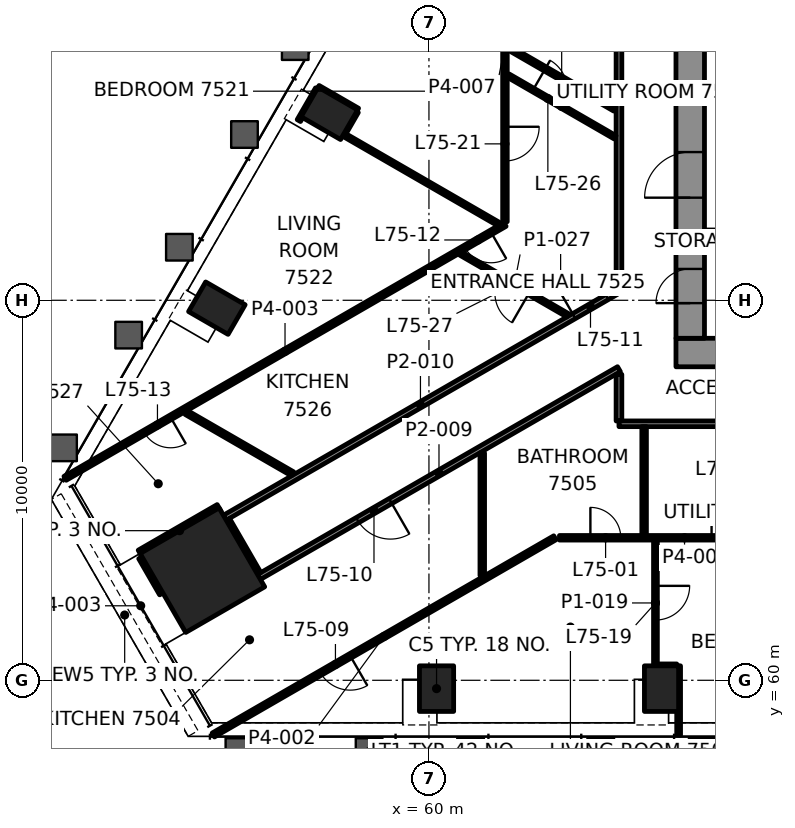
"""IFC4 building model, lengths in metres.
Left out: names, types, materials, properties, quantities, classifications, styles, units other than length and angle.
Written with IfcOpenShell. Run it as: python <this file> out.ifc"""

import sys

from ifc_helpers import new_model, si_unit, direction, frame, frame_2d, origin, origin_2d, place, context, subcontext, project, spatial, rectangle, hollow_rectangle, extrude, element, fill, save


model = new_model("IFC4")
c1 = context("Model", 3, precision=1e-05, world=origin(), true_north=direction((0.0, 1.0)))
c2 = subcontext(c1, "Body", "Model", "MODEL_VIEW")
j1 = project(units=[si_unit("LENGTHUNIT", "METRE"), si_unit("PLANEANGLEUNIT", "RADIAN")], contexts=[c1])
p1 = place(None, origin())
s1 = spatial("IfcSite", under=j1, at=p1, CompositionType="ELEMENT")
p2 = place(p1, origin())
s2 = spatial("IfcBuilding", under=s1, at=p2, CompositionType="ELEMENT")
p3 = place(p2, frame((0.0, 0.0, 309.1)))
s3 = spatial("IfcBuildingStorey", under=s2, at=p3, CompositionType="ELEMENT", Elevation=309.1)
p4 = place(p3, frame((54.039, 62.898, 0.0), z_axis=(0.0, 0.0, 1.0), x_axis=(0.5, -0.866025403784, 0.0)))
e1 = element("IfcColumn", 1, at=p4, inside=s3, PredefinedType="COLUMN", context=c2, shape_type="SweptSolid", body=[
    extrude(rectangle(XDim=2.4, YDim=2.4, at=origin_2d()), origin(), (0.0, 0.0, 1.0), 3.5),
])
for number, where, z_axis, x_axis in (
    (2, (60.2, 59.78, -0.0), (0.0, 0.0, 1.0), (1.0, 0.0, 0.0)),
    (3, (66.12, 59.78, -0.0), (0.0, 0.0, 1.0), (1.0, 0.0, 0.0)),
    (4, (57.379, 74.919, -0.0), (0.0, 0.0, 1.0), (-0.5, -0.866, 0.0)),
    (5, (54.419, 69.793, -0.0), (0.0, 0.0, 1.0), (-0.5, -0.866, 0.0)),
):
    element("IfcColumn", number, at=place(p3, frame(where, z_axis=z_axis, x_axis=x_axis)), inside=s3, PredefinedType="COLUMN", context=c2, shape_type="SweptSolid", body=[
        extrude(hollow_rectangle(XDim=0.9, YDim=1.2, WallThickness=0.06, at=origin_2d()), origin(), (0.0, 0.0, 1.0), 3.5),
    ])
p5 = place(p3, frame((66.5, 68.625, 0.0), z_axis=(0.0, 0.0, 1.0), x_axis=(1.0, 0.0, 0.0)))
e6 = element("IfcWall", 6, at=p5, inside=s3, PredefinedType="SHEAR", context=c2, shape_type="SweptSolid", body=[
    extrude(rectangle(XDim=17.0, YDim=0.75, at=frame_2d((8.5, 0.0))), origin(), (0.0, 0.0, 1.0), 3.3),
])
p6 = place(p5, frame((2.7, 0.0, 0.0)))
e7 = element("IfcOpeningElement", 7, at=p6, cuts=e6, PredefinedType="OPENING", context=c2, shape_type="SweptSolid", body=[
    extrude(rectangle(XDim=0.9, YDim=2.1, at=frame_2d((0.45, 1.05))), frame((0.0, 0.385, 0.0), z_axis=(0.0, -1.0, 0.0), x_axis=(1.0, 0.0, 0.0)), (0.0, 0.0, 1.0), 0.77),
])
p7 = place(p3, frame((66.875, 69.0, 0.0), z_axis=(0.0, 0.0, 1.0), x_axis=(0.0, 1.0, 0.0)))
e8 = element("IfcWall", 8, at=p7, inside=s3, PredefinedType="SHEAR", context=c2, shape_type="SweptSolid", body=[
    extrude(rectangle(XDim=12.0, YDim=0.75, at=frame_2d((6.0, 0.0))), origin(), (0.0, 0.0, 1.0), 3.3),
])
p8 = place(p7, frame((3.7, 0.0, 0.0)))
e9 = element("IfcOpeningElement", 9, at=p8, cuts=e8, PredefinedType="OPENING", context=c2, shape_type="SweptSolid", body=[
    extrude(rectangle(XDim=1.2, YDim=2.1, at=frame_2d((0.6, 1.05))), frame((0.0, 0.385, 0.0), z_axis=(0.0, -1.0, 0.0), x_axis=(1.0, 0.0, 0.0)), (0.0, 0.0, 1.0), 0.77),
])
p9 = place(p7, frame((0.925, 0.0, 0.0)))
e10 = element("IfcOpeningElement", 10, at=p9, cuts=e8, PredefinedType="OPENING", context=c2, shape_type="SweptSolid", body=[
    extrude(rectangle(XDim=0.9, YDim=2.1, at=frame_2d((0.45, 1.05))), frame((0.0, 0.385, 0.0), z_axis=(0.0, -1.0, 0.0), x_axis=(1.0, 0.0, 0.0)), (0.0, 0.0, 1.0), 0.77),
])
p10 = place(p3, frame((66.02, 60.38, 0.0), z_axis=(0.0, 0.0, 1.0), x_axis=(1.0, 0.0, 0.0)))
e11 = element("IfcWall", 11, at=p10, inside=s3, PredefinedType="PARTITIONING", context=c2, shape_type="SweptSolid", body=[
    extrude(rectangle(XDim=0.5, YDim=0.1, at=frame_2d((0.25, 0.0))), origin(), (0.0, 0.0, 1.0), 2.7),
])
p11 = place(p3, frame((63.434, 63.75, 0.0), z_axis=(0.0, 0.0, 1.0), x_axis=(1.0, 0.0, 0.0)))
e12 = element("IfcWall", 12, at=p11, inside=s3, PredefinedType="PARTITIONING", context=c2, shape_type="SweptSolid", body=[
    extrude(rectangle(XDim=6.582, YDim=0.12, at=frame_2d((3.291, 0.0))), origin(), (0.0, 0.0, 1.0), 2.7),
])
p12 = place(p11, frame((0.814, 0.0, 0.0)))
e13 = element("IfcOpeningElement", 13, at=p12, cuts=e12, PredefinedType="OPENING", context=c2, shape_type="SweptSolid", body=[
    extrude(rectangle(XDim=0.8, YDim=2.1, at=frame_2d((0.4, 1.05))), frame((0.0, 0.07, 0.0), z_axis=(0.0, -1.0, 0.0), x_axis=(1.0, 0.0, 0.0)), (0.0, 0.0, 1.0), 0.14),
])
p13 = place(p11, frame((4.002, 0.0, 0.0)))
e14 = element("IfcOpeningElement", 14, at=p13, cuts=e12, PredefinedType="OPENING", context=c2, shape_type="SweptSolid", body=[
    extrude(rectangle(XDim=0.9, YDim=2.1, at=frame_2d((0.45, 1.05))), frame((0.0, 0.07, 0.0), z_axis=(0.0, -1.0, 0.0), x_axis=(1.0, 0.0, 0.0)), (0.0, 0.0, 1.0), 0.14),
])
p14 = place(p3, frame((85.0, 66.75, 0.0), z_axis=(0.0, 0.0, 1.0), x_axis=(-1.0, 0.0, 0.0)))
e15 = element("IfcWall", 15, at=p14, inside=s3, PredefinedType="PARTITIONING", context=c2, shape_type="SweptSolid", body=[
    extrude(rectangle(XDim=20.0, YDim=0.15, at=frame_2d((10.0, 0.0))), origin(), (0.0, 0.0, 1.0), 2.7),
])
p15 = place(p14, frame((2.135, 0.0, 0.0)))
e16 = element("IfcOpeningElement", 16, at=p15, cuts=e15, PredefinedType="OPENING", context=c2, shape_type="SweptSolid", body=[
    extrude(rectangle(XDim=1.0, YDim=2.1, at=frame_2d((0.5, 1.05))), frame((0.0, 0.085, 0.0), z_axis=(0.0, -1.0, 0.0), x_axis=(1.0, 0.0, 0.0)), (0.0, 0.0, 1.0), 0.17),
])
p16 = place(p14, frame((9.55, 0.0, 0.0)))
e17 = element("IfcOpeningElement", 17, at=p16, cuts=e15, PredefinedType="OPENING", context=c2, shape_type="SweptSolid", body=[
    extrude(rectangle(XDim=0.9, YDim=2.1, at=frame_2d((0.45, 1.05))), frame((0.0, 0.085, 0.0), z_axis=(0.0, -1.0, 0.0), x_axis=(1.0, 0.0, 0.0)), (0.0, 0.0, 1.0), 0.17),
])
p17 = place(p3, frame((63.314, 63.75, 0.0), z_axis=(0.0, 0.0, 1.0), x_axis=(-0.866030084385, -0.499991892875, 0.0)))
e18 = element("IfcWall", 18, at=p17, inside=s3, PredefinedType="PARTITIONING", context=c2, shape_type="SweptSolid", body=[
    extrude(rectangle(XDim=10.38, YDim=0.12, at=frame_2d((5.19, 0.0))), origin(), (0.0, 0.0, 1.0), 2.7),
])
p18 = place(p17, frame((6.218, 0.0, 0.0)))
e19 = element("IfcOpeningElement", 19, at=p18, cuts=e18, PredefinedType="OPENING", context=c2, shape_type="SweptSolid", body=[
    extrude(rectangle(XDim=0.9, YDim=2.1, at=frame_2d((0.45, 1.05))), frame((0.0, 0.07, 0.0), z_axis=(0.0, -1.0, 0.0), x_axis=(1.0, 0.0, 0.0)), (0.0, 0.0, 1.0), 0.14),
])
p19 = place(p3, frame((65.0, 68.187, 0.0), z_axis=(0.0, 0.0, 1.0), x_axis=(-0.866028339337, -0.499994915439, 0.0)))
e20 = element("IfcWall", 20, at=p19, inside=s3, PredefinedType="PARTITIONING", context=c2, shape_type="SweptSolid", body=[
    extrude(rectangle(XDim=10.937, YDim=0.15, at=frame_2d((5.468, 0.0))), origin(), (0.0, 0.0, 1.0), 2.697),
])
p20 = place(p19, frame((6.943, 0.0, 0.0)))
e21 = element("IfcOpeningElement", 21, at=p20, cuts=e20, PredefinedType="OPENING", context=c2, shape_type="SweptSolid", body=[
    extrude(rectangle(XDim=1.0, YDim=2.1, at=frame_2d((0.5, 1.05))), frame((0.0, 0.085, 0.0), z_axis=(0.0, -1.0, 0.0), x_axis=(1.0, 0.0, 0.0)), (0.0, 0.0, 1.0), 0.17),
])
p21 = place(p3, frame((54.628, 64.278, 0.0), z_axis=(0.0, 0.0, 1.0), x_axis=(0.866033426221, 0.499986104476, 0.0)))
e22 = element("IfcWall", 22, at=p21, inside=s3, PredefinedType="PARTITIONING", context=c2, shape_type="SweptSolid", body=[
    extrude(rectangle(XDim=11.89, YDim=0.15, at=frame_2d((5.945, 0.0))), origin(), (0.0, 0.0, 1.0), 2.7),
])
p22 = place(p21, frame((10.612, 0.0, 0.0)))
e23 = element("IfcOpeningElement", 23, at=p22, cuts=e22, PredefinedType="OPENING", context=c2, shape_type="SweptSolid", body=[
    extrude(rectangle(XDim=1.0, YDim=2.1, at=frame_2d((0.5, 1.05))), frame((0.0, 0.085, 0.0), z_axis=(0.0, -1.0, 0.0), x_axis=(1.0, 0.0, 0.0)), (0.0, 0.0, 1.0), 0.17),
])
p23 = place(p3, frame((52.4, 63.337, 0.0), z_axis=(0.0, 0.0, 1.0), x_axis=(0.866024647952, 0.500001309137, 0.0)))
e24 = element("IfcWall", 24, at=p23, inside=s3, PredefinedType="PARTITIONING", context=c2, shape_type="SweptSolid", body=[
    extrude(rectangle(XDim=2.4, YDim=0.2, at=frame_2d((1.2, 0.0))), origin(), (0.0, 0.0, 1.0), 2.7),
])
p24 = place(p3, frame((62.0, 71.998, 0.0), z_axis=(0.0, 0.0, 1.0), x_axis=(-0.866025574339, -0.499999704591, 0.0)))
e25 = element("IfcWall", 25, at=p24, inside=s3, PredefinedType="PARTITIONING", context=c2, shape_type="SweptSolid", body=[
    extrude(rectangle(XDim=13.365, YDim=0.12, at=frame_2d((6.682, 0.0))), origin(), (0.0, 0.0, 1.0), 2.7),
])
p25 = place(p24, frame((0.421, 0.0, 0.0)))
e26 = element("IfcOpeningElement", 26, at=p25, cuts=e25, PredefinedType="OPENING", context=c2, shape_type="SweptSolid", body=[
    extrude(rectangle(XDim=0.8, YDim=2.1, at=frame_2d((0.4, 1.05))), frame((0.0, 0.07, 0.0), z_axis=(0.0, -1.0, 0.0), x_axis=(1.0, 0.0, 0.0)), (0.0, 0.0, 1.0), 0.14),
])
p26 = place(p24, frame((10.158, 0.0, 0.0)))
e27 = element("IfcOpeningElement", 27, at=p26, cuts=e25, PredefinedType="OPENING", context=c2, shape_type="SweptSolid", body=[
    extrude(rectangle(XDim=0.8, YDim=2.1, at=frame_2d((0.4, 1.05))), frame((0.0, 0.07, 0.0), z_axis=(0.0, -1.0, 0.0), x_axis=(1.0, 0.0, 0.0)), (0.0, 0.0, 1.0), 0.14),
])
p27 = place(p3, frame((57.776, 74.406, 0.0), z_axis=(0.0, 0.0, 1.0), x_axis=(0.500246099629, 0.865883271467, 0.0)))
e28 = element("IfcWall", 28, at=p27, inside=s3, PredefinedType="PARTITIONING", context=c2, shape_type="SweptSolid", body=[
    extrude(rectangle(XDim=0.646, YDim=0.1, at=frame_2d((0.323, 0.0))), origin(), (0.0, 0.0, 1.0), 2.7),
])
p28 = place(p3, frame((56.576, 74.729, 0.0), z_axis=(0.0, 0.0, 1.0), x_axis=(0.500079715141, 0.865979375335, 0.0)))
e29 = element("IfcWall", 29, at=p28, inside=s3, PredefinedType="PARTITIONING", context=c2, shape_type="SweptSolid", body=[
    extrude(rectangle(XDim=0.966, YDim=0.1, at=frame_2d((0.483, 0.0))), origin(), (0.0, 0.0, 1.0), 2.7),
])
p29 = place(p3, frame((66.57, 58.56, 0.0), z_axis=(0.0, 0.0, 1.0), x_axis=(0.0, 1.0, 0.0)))
e30 = element("IfcWall", 30, at=p29, inside=s3, PredefinedType="PARTITIONING", context=c2, shape_type="SweptSolid", body=[
    extrude(rectangle(XDim=1.82, YDim=0.1, at=frame_2d((0.91, 0.0))), origin(), (0.0, 0.0, 1.0), 2.688),
])
p30 = place(p3, frame((65.96, 63.69, 0.0), z_axis=(0.0, 0.0, 1.0), x_axis=(0.0, -1.0, 0.0)))
e31 = element("IfcWall", 31, at=p30, inside=s3, PredefinedType="PARTITIONING", context=c2, shape_type="SweptSolid", body=[
    extrude(rectangle(XDim=3.31, YDim=0.1, at=frame_2d((1.655, 0.0))), origin(), (0.0, 0.0, 1.0), 2.7),
])
p31 = place(p30, frame((1.205, 0.0, 0.0)))
e32 = element("IfcOpeningElement", 32, at=p31, cuts=e31, PredefinedType="OPENING", context=c2, shape_type="SweptSolid", body=[
    extrude(rectangle(XDim=0.9, YDim=2.1, at=frame_2d((0.45, 1.05))), frame((0.0, 0.06, 0.0), z_axis=(0.0, -1.0, 0.0), x_axis=(1.0, 0.0, 0.0)), (0.0, 0.0, 1.0), 0.12),
])
p32 = place(p3, frame((65.662, 63.81, 0.0), z_axis=(0.0, 0.0, 1.0), x_axis=(0.0, 1.0, 0.0)))
e33 = element("IfcWall", 33, at=p32, inside=s3, PredefinedType="PARTITIONING", context=c2, shape_type="SweptSolid", body=[
    extrude(rectangle(XDim=2.865, YDim=0.12, at=frame_2d((1.433, 0.0))), origin(), (0.0, 0.0, 1.0), 2.7),
])
p33 = place(p3, frame((65.0, 66.825, 0.0), z_axis=(0.0, 0.0, 1.0), x_axis=(0.0, 1.0, 0.0)))
e34 = element("IfcWall", 34, at=p33, inside=s3, PredefinedType="PARTITIONING", context=c2, shape_type="SweptSolid", body=[
    extrude(rectangle(XDim=1.226, YDim=0.15, at=frame_2d((0.613, 0.0))), origin(), (0.0, 0.0, 1.0), 2.697),
])
p34 = place(p3, frame((65.0, 70.266, 0.0), z_axis=(0.0, 0.0, 1.0), x_axis=(0.0, 1.0, 0.0)))
e35 = element("IfcWall", 35, at=p34, inside=s3, PredefinedType="PARTITIONING", context=c2, shape_type="SweptSolid", body=[
    extrude(rectangle(XDim=12.984, YDim=0.15, at=frame_2d((6.492, 0.0))), origin(), (0.0, 0.0, 1.0), 2.7),
])
p35 = place(p3, frame((62.0, 81.366, 0.0), z_axis=(0.0, 0.0, 1.0), x_axis=(0.0, -1.0, 0.0)))
e36 = element("IfcWall", 36, at=p35, inside=s3, PredefinedType="PARTITIONING", context=c2, shape_type="SweptSolid", body=[
    extrude(rectangle(XDim=9.299, YDim=0.12, at=frame_2d((4.649, 0.0))), origin(), (0.0, 0.0, 1.0), 2.7),
])
p36 = place(p35, frame((2.033, 0.0, 0.0)))
e37 = element("IfcOpeningElement", 37, at=p36, cuts=e36, PredefinedType="OPENING", context=c2, shape_type="SweptSolid", body=[
    extrude(rectangle(XDim=0.8, YDim=2.1, at=frame_2d((0.4, 1.05))), frame((0.0, 0.07, 0.0), z_axis=(0.0, -1.0, 0.0), x_axis=(1.0, 0.0, 0.0)), (0.0, 0.0, 1.0), 0.14),
])
p37 = place(p35, frame((6.8, 0.0, 0.0)))
e38 = element("IfcOpeningElement", 38, at=p37, cuts=e36, PredefinedType="OPENING", context=c2, shape_type="SweptSolid", body=[
    extrude(rectangle(XDim=0.9, YDim=2.1, at=frame_2d((0.45, 1.05))), frame((0.0, 0.07, 0.0), z_axis=(0.0, -1.0, 0.0), x_axis=(1.0, 0.0, 0.0)), (0.0, 0.0, 1.0), 0.14),
])
p38 = place(p3, frame((61.403, 62.756, 0.0), z_axis=(0.0, 0.0, 1.0), x_axis=(0.0, 1.0, 0.0)))
e39 = element("IfcWall", 39, at=p38, inside=s3, PredefinedType="PARTITIONING", context=c2, shape_type="SweptSolid", body=[
    extrude(rectangle(XDim=3.228, YDim=0.12, at=frame_2d((1.614, 0.0))), origin(), (0.0, 0.0, 1.0), 2.697),
])
p39 = place(p3, frame((55.49, 62.784, 0.0), z_axis=(0.0, 0.0, 1.0), x_axis=(-0.499970888758, 0.866042210515, 0.0)))
e40 = element("IfcWall", 40, at=p39, inside=s3, PredefinedType="PARTITIONING", context=c2, shape_type="SweptSolid", body=[
    extrude(rectangle(XDim=1.645, YDim=0.2, at=frame_2d((0.822, 0.0))), origin(), (0.0, 0.0, 1.0), 2.697),
])
p40 = place(p3, frame((53.0, 62.298, 0.0), z_axis=(0.0, 0.0, 1.0), x_axis=(-0.50002983664, 0.866008176907, 0.0)))
e41 = element("IfcWall", 41, at=p40, inside=s3, PredefinedType="PARTITIONING", context=c2, shape_type="SweptSolid", body=[
    extrude(rectangle(XDim=1.1, YDim=0.2, at=frame_2d((0.55, 0.0))), origin(), (0.0, 0.0, 1.0), 2.7),
])
p41 = place(p3, frame((64.89, 75.031, 0.0), z_axis=(0.0, 0.0, 1.0), x_axis=(-0.866033195618, 0.499986503906, 0.0)))
e42 = element("IfcWall", 42, at=p41, inside=s3, PredefinedType="PARTITIONING", context=c2, shape_type="SweptSolid", body=[
    extrude(rectangle(XDim=3.228, YDim=0.12, at=frame_2d((1.614, 0.0))), origin(), (0.0, 0.0, 1.0), 2.7),
])
p42 = place(p3, frame((62.086, 75.912, 0.0), z_axis=(0.0, 0.0, 1.0), x_axis=(0.866032882975, -0.499987045439, 0.0)))
e43 = element("IfcWall", 43, at=p42, inside=s3, PredefinedType="PARTITIONING", context=c2, shape_type="SweptSolid", body=[
    extrude(rectangle(XDim=3.248, YDim=0.1, at=frame_2d((1.624, 0.0))), origin(), (0.0, 0.0, 1.0), 2.7),
])
p43 = place(p42, frame((0.754, 0.0, 0.0)))
e44 = element("IfcOpeningElement", 44, at=p43, cuts=e43, PredefinedType="OPENING", context=c2, shape_type="SweptSolid", body=[
    extrude(rectangle(XDim=0.9, YDim=2.1, at=frame_2d((0.45, 1.05))), frame((0.0, 0.06, 0.0), z_axis=(0.0, -1.0, 0.0), x_axis=(1.0, 0.0, 0.0)), (0.0, 0.0, 1.0), 0.12),
])
p44 = place(p3, frame((58.124, 75.01, 0.0), z_axis=(0.0, 0.0, 1.0), x_axis=(-0.865978732077, 0.500080829057, 0.0)))
e45 = element("IfcWall", 45, at=p44, inside=s3, PredefinedType="PARTITIONING", context=c2, shape_type="SweptSolid", body=[
    extrude(rectangle(XDim=1.199, YDim=0.1, at=frame_2d((0.6, 0.0))), origin(), (0.0, 0.0, 1.0), 2.688),
])
p45 = place(p3, frame((61.837, 72.003, 0.0), z_axis=(0.0, 0.0, 1.0), x_axis=(-0.86602790099, 0.499995674689, 0.0)))
e46 = element("IfcWall", 46, at=p45, inside=s3, PredefinedType="PARTITIONING", context=c2, shape_type="SweptSolid", body=[
    extrude(rectangle(XDim=4.718, YDim=0.1, at=frame_2d((2.359, 0.0))), origin(), (0.0, 0.0, 1.0), 2.7),
])
p46 = place(p3, frame((63.652, 69.604, 0.0), z_axis=(0.0, 0.0, 1.0), x_axis=(-0.866032882975, 0.499987045439, 0.0)))
e47 = element("IfcWall", 47, at=p46, inside=s3, PredefinedType="PARTITIONING", context=c2, shape_type="SweptSolid", body=[
    extrude(rectangle(XDim=3.248, YDim=0.1, at=frame_2d((1.624, 0.0))), origin(), (0.0, 0.0, 1.0), 2.7),
])
p47 = place(p46, frame((1.174, 0.0, 0.0)))
e48 = element("IfcOpeningElement", 48, at=p47, cuts=e47, PredefinedType="OPENING", context=c2, shape_type="SweptSolid", body=[
    extrude(rectangle(XDim=0.9, YDim=2.1, at=frame_2d((0.45, 1.05))), frame((0.0, 0.06, 0.0), z_axis=(0.0, -1.0, 0.0), x_axis=(1.0, 0.0, 0.0)), (0.0, 0.0, 1.0), 0.12),
])
p48 = place(p3, frame((56.41, 65.433, 0.0), z_axis=(0.0, 0.0, 1.0), x_axis=(-0.866000447062, 0.500043223821, 0.0)))
e49 = element("IfcWall", 49, at=p48, inside=s3, PredefinedType="PARTITIONING", context=c2, shape_type="SweptSolid", body=[
    extrude(rectangle(XDim=3.228, YDim=0.12, at=frame_2d((1.614, 0.0))), origin(), (0.0, 0.0, 1.0), 2.7),
])
p49 = place(p3, frame((50.194, 64.835, 0.0), z_axis=(0.0, 0.0, 1.0), x_axis=(0.500012057535, -0.866018442252, 0.0)))
e50 = element("IfcWall", 50, at=p49, inside=s3, PredefinedType="PARAPET", context=c2, shape_type="SweptSolid", body=[
    extrude(rectangle(XDim=7.2, YDim=0.3, at=frame_2d((3.6, 0.0))), origin(), (0.0, 0.0, 1.0), 1.1),
])
p50 = place(p3, frame((67.25, 71.75, 0.0), z_axis=(0.0, 0.0, 1.0), x_axis=(1.0, 0.0, 0.0)))
e51 = element("IfcWall", 51, at=p50, inside=s3, PredefinedType="PARTITIONING", context=c2, shape_type="SweptSolid", body=[
    extrude(rectangle(XDim=3.05, YDim=0.2, at=frame_2d((1.525, 0.0))), origin(), (0.0, 0.0, 1.0), 3.3),
])
p51 = place(p12, origin())
e52 = element("IfcDoor", 52, at=p51, inside=s3, OperationType="SINGLE_SWING_RIGHT", PredefinedType="DOOR", context=c2, shape_type="SweptSolid", body=[
    extrude(rectangle(XDim=0.8, YDim=2.1, at=frame_2d((0.4, 1.05))), frame((0.0, 0.025, 0.0), z_axis=(0.0, -1.0, 0.0), x_axis=(1.0, 0.0, 0.0)), (0.0, 0.0, 1.0), 0.05),
])
fill(e13, e52)
p52 = place(p13, origin())
e53 = element("IfcDoor", 53, at=p52, inside=s3, OperationType="SINGLE_SWING_LEFT", PredefinedType="DOOR", context=c2, shape_type="SweptSolid", body=[
    extrude(rectangle(XDim=0.9, YDim=2.1, at=frame_2d((0.45, 1.05))), frame((0.0, 0.025, 0.0), z_axis=(0.0, -1.0, 0.0), x_axis=(1.0, 0.0, 0.0)), (0.0, 0.0, 1.0), 0.05),
])
fill(e14, e53)
p53 = place(p18, origin())
e54 = element("IfcDoor", 54, at=p53, inside=s3, OperationType="SINGLE_SWING_RIGHT", PredefinedType="DOOR", context=c2, shape_type="SweptSolid", body=[
    extrude(rectangle(XDim=0.9, YDim=2.1, at=frame_2d((0.45, 1.05))), frame((0.0, 0.025, 0.0), z_axis=(0.0, -1.0, 0.0), x_axis=(1.0, 0.0, 0.0)), (0.0, 0.0, 1.0), 0.05),
])
fill(e19, e54)
p54 = place(p20, origin())
e55 = element("IfcDoor", 55, at=p54, inside=s3, OperationType="SINGLE_SWING_LEFT", PredefinedType="DOOR", context=c2, shape_type="SweptSolid", body=[
    extrude(rectangle(XDim=1.0, YDim=2.1, at=frame_2d((0.5, 1.05))), frame((0.0, 0.025, 0.0), z_axis=(0.0, -1.0, 0.0), x_axis=(1.0, 0.0, 0.0)), (0.0, 0.0, 1.0), 0.05),
])
fill(e21, e55)
p55 = place(p22, origin())
e56 = element("IfcDoor", 56, at=p55, inside=s3, OperationType="SINGLE_SWING_RIGHT", PredefinedType="DOOR", context=c2, shape_type="SweptSolid", body=[
    extrude(rectangle(XDim=1.0, YDim=2.1, at=frame_2d((0.5, 1.05))), frame((0.0, 0.025, 0.0), z_axis=(0.0, -1.0, 0.0), x_axis=(1.0, 0.0, 0.0)), (0.0, 0.0, 1.0), 0.05),
])
fill(e23, e56)
p56 = place(p25, origin())
e57 = element("IfcDoor", 57, at=p56, inside=s3, OperationType="SINGLE_SWING_RIGHT", PredefinedType="DOOR", context=c2, shape_type="SweptSolid", body=[
    extrude(rectangle(XDim=0.8, YDim=2.1, at=frame_2d((0.4, 1.05))), frame((0.0, 0.025, 0.0), z_axis=(0.0, -1.0, 0.0), x_axis=(1.0, 0.0, 0.0)), (0.0, 0.0, 1.0), 0.05),
])
fill(e26, e57)
p57 = place(p26, origin())
e58 = element("IfcDoor", 58, at=p57, inside=s3, OperationType="SINGLE_SWING_RIGHT", PredefinedType="DOOR", context=c2, shape_type="SweptSolid", body=[
    extrude(rectangle(XDim=0.8, YDim=2.1, at=frame_2d((0.4, 1.05))), frame((0.0, 0.025, 0.0), z_axis=(0.0, -1.0, 0.0), x_axis=(1.0, 0.0, 0.0)), (0.0, 0.0, 1.0), 0.05),
])
fill(e27, e58)
p58 = place(p31, origin())
e59 = element("IfcDoor", 59, at=p58, inside=s3, OperationType="SINGLE_SWING_RIGHT", PredefinedType="DOOR", context=c2, shape_type="SweptSolid", body=[
    extrude(rectangle(XDim=0.9, YDim=2.1, at=frame_2d((0.45, 1.05))), frame((0.0, 0.025, 0.0), z_axis=(0.0, -1.0, 0.0), x_axis=(1.0, 0.0, 0.0)), (0.0, 0.0, 1.0), 0.05),
])
fill(e32, e59)
p59 = place(p37, origin())
e60 = element("IfcDoor", 60, at=p59, inside=s3, OperationType="SINGLE_SWING_RIGHT", PredefinedType="DOOR", context=c2, shape_type="SweptSolid", body=[
    extrude(rectangle(XDim=0.9, YDim=2.1, at=frame_2d((0.45, 1.05))), frame((0.0, 0.025, 0.0), z_axis=(0.0, -1.0, 0.0), x_axis=(1.0, 0.0, 0.0)), (0.0, 0.0, 1.0), 0.05),
])
fill(e38, e60)
p60 = place(p43, origin())
e61 = element("IfcDoor", 61, at=p60, inside=s3, OperationType="SINGLE_SWING_LEFT", PredefinedType="DOOR", context=c2, shape_type="SweptSolid", body=[
    extrude(rectangle(XDim=0.9, YDim=2.1, at=frame_2d((0.45, 1.05))), frame((0.0, 0.025, 0.0), z_axis=(0.0, -1.0, 0.0), x_axis=(1.0, 0.0, 0.0)), (0.0, 0.0, 1.0), 0.05),
])
fill(e44, e61)
p61 = place(p47, origin())
e62 = element("IfcDoor", 62, at=p61, inside=s3, OperationType="SINGLE_SWING_RIGHT", PredefinedType="DOOR", context=c2, shape_type="SweptSolid", body=[
    extrude(rectangle(XDim=0.9, YDim=2.1, at=frame_2d((0.45, 1.05))), frame((0.0, 0.025, 0.0), z_axis=(0.0, -1.0, 0.0), x_axis=(1.0, 0.0, 0.0)), (0.0, 0.0, 1.0), 0.05),
])
fill(e48, e62)
p62 = place(p8, origin())
e63 = element("IfcDoor", 63, at=p62, inside=s3, OperationType="SINGLE_SWING_RIGHT", PredefinedType="DOOR", context=c2, shape_type="SweptSolid", body=[
    extrude(rectangle(XDim=1.2, YDim=2.1, at=frame_2d((0.6, 1.05))), frame((0.0, 0.095, 0.0), z_axis=(0.0, -1.0, 0.0), x_axis=(1.0, 0.0, 0.0)), (0.0, 0.0, 1.0), 0.19),
])
fill(e9, e63)
p63 = place(p9, origin())
e64 = element("IfcDoor", 64, at=p63, inside=s3, OperationType="SINGLE_SWING_RIGHT", PredefinedType="DOOR", context=c2, shape_type="SweptSolid", body=[
    extrude(rectangle(XDim=0.9, YDim=2.1, at=frame_2d((0.45, 1.05))), frame((0.0, 0.095, 0.0), z_axis=(0.0, -1.0, 0.0), x_axis=(1.0, 0.0, 0.0)), (0.0, 0.0, 1.0), 0.19),
])
fill(e10, e64)
save(model, sys.argv[1])
